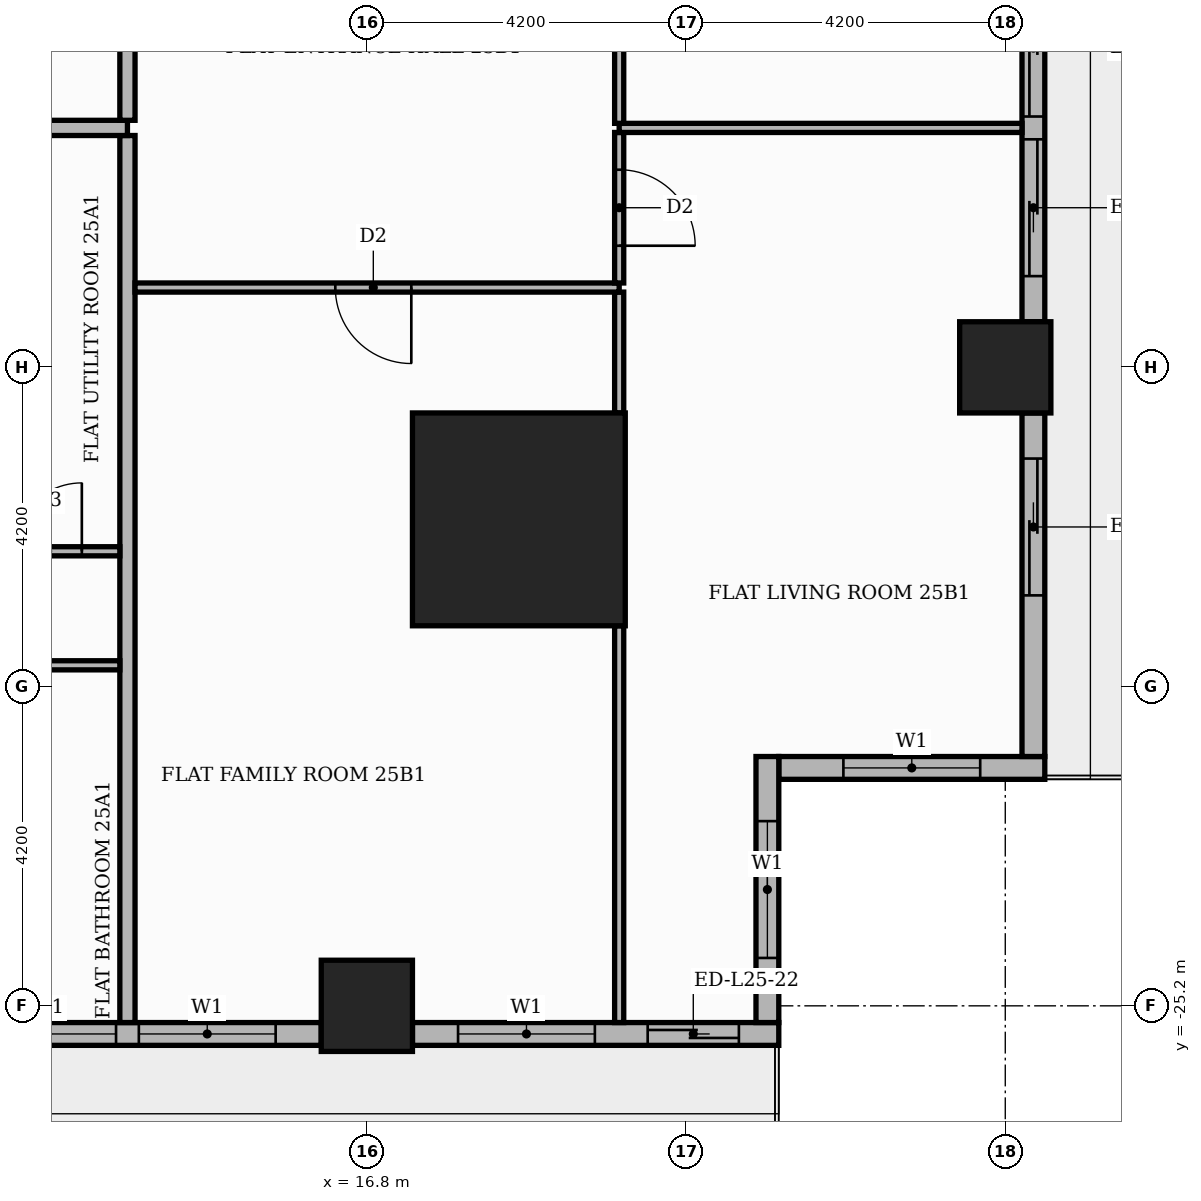
"""IFC4 building model, lengths in metres.
Left out: names, types, materials, properties, quantities, classifications, styles, units other than length and angle.
Written with IfcOpenShell. Run it as: python <this file> out.ifc"""

import sys

from ifc_helpers import new_model, si_unit, direction, frame, frame_2d, origin, origin_2d, place, context, subcontext, project, spatial, rectangle, extrude, element, fill, save


model = new_model("IFC4")
c1 = context("Model", 3, precision=1e-05, world=origin(), true_north=direction((0.0, 1.0)))
c2 = subcontext(c1, "Body", "Model", "MODEL_VIEW")
j1 = project(units=[si_unit("LENGTHUNIT", "METRE"), si_unit("PLANEANGLEUNIT", "RADIAN")], contexts=[c1])
p1 = place(None, origin())
s1 = spatial("IfcSite", under=j1, at=p1, CompositionType="ELEMENT")
p2 = place(p1, origin())
s2 = spatial("IfcBuilding", under=s1, at=p2, CompositionType="ELEMENT")
p3 = place(p2, frame((0.0, 0.0, 106.5)))
s3 = spatial("IfcBuildingStorey", under=s2, at=p3, CompositionType="ELEMENT", Elevation=106.5)
p4 = place(p3, frame((18.8, -18.8, 0.0), z_axis=(0.0, 0.0, 1.0), x_axis=(1.0, 0.0, 0.0)))
e1 = element("IfcColumn", 1, at=p4, inside=s3, PredefinedType="COLUMN", context=c2, shape_type="SweptSolid", body=[
    extrude(rectangle(XDim=2.8, YDim=2.8, at=origin_2d()), origin(), (0.0, 0.0, 1.0), 3.9),
])
for number, where, z_axis, x_axis in (
    (2, (25.2, -16.8, 0.0), (0.0, 0.0, 1.0), (1.0, 0.0, 0.0)),
    (3, (16.8, -25.2, 0.0), (0.0, 0.0, 1.0), (1.0, 0.0, 0.0)),
):
    element("IfcColumn", number, at=place(p3, frame(where, z_axis=z_axis, x_axis=x_axis)), inside=s3, PredefinedType="COLUMN", context=c2, shape_type="SweptSolid", body=[
        extrude(rectangle(XDim=1.2, YDim=1.2, at=origin_2d()), origin(), (0.0, 0.0, 1.0), 3.9),
    ])
p5 = place(p3, frame((22.22, -22.07, 0.0), z_axis=(0.0, 0.0, 1.0), x_axis=(1.0, 0.0, 0.0)))
e4 = element("IfcWall", 4, at=p5, inside=s3, PredefinedType="STANDARD", context=c2, shape_type="SweptSolid", body=[
    extrude(rectangle(XDim=3.5, YDim=0.3, at=frame_2d((1.75, 0.0))), origin(), (0.0, 0.0, 1.0), 3.48),
])
p6 = place(p5, frame((0.85, 0.0, 0.9)))
e5 = element("IfcOpeningElement", 5, at=p6, cuts=e4, PredefinedType="OPENING", context=c2, shape_type="SweptSolid", body=[
    extrude(rectangle(XDim=1.8, YDim=2.1, at=frame_2d((0.9, 1.05))), frame((0.0, 0.16, 0.0), z_axis=(0.0, -1.0, 0.0), x_axis=(1.0, 0.0, 0.0)), (0.0, 0.0, 1.0), 0.32),
])
p7 = place(p3, frame((25.57, -21.92, 0.0), z_axis=(0.0, 0.0, 1.0), x_axis=(0.0, 1.0, 0.0)))
e6 = element("IfcWall", 6, at=p7, inside=s3, PredefinedType="STANDARD", context=c2, shape_type="SweptSolid", body=[
    extrude(rectangle(XDim=4.52, YDim=0.3, at=frame_2d((2.26, 0.0))), origin(), (0.0, 0.0, 1.0), 3.48),
])
p8 = place(p7, frame((2.12, 0.0, 0.0)))
e7 = element("IfcOpeningElement", 7, at=p8, cuts=e6, PredefinedType="OPENING", context=c2, shape_type="SweptSolid", body=[
    extrude(rectangle(XDim=1.8, YDim=2.4, at=frame_2d((0.9, 1.2))), frame((0.0, 0.16, 0.0), z_axis=(0.0, -1.0, 0.0), x_axis=(1.0, 0.0, 0.0)), (0.0, 0.0, 1.0), 0.32),
])
p9 = place(p3, frame((25.57, -16.2, 0.0), z_axis=(0.0, 0.0, 1.0), x_axis=(0.0, 1.0, 0.0)))
e8 = element("IfcWall", 8, at=p9, inside=s3, PredefinedType="STANDARD", context=c2, shape_type="SweptSolid", body=[
    extrude(rectangle(XDim=7.2, YDim=0.3, at=frame_2d((3.6, 0.0))), origin(), (0.0, 0.0, 1.0), 3.48),
])
p10 = place(p9, frame((0.6, 0.0, 0.0)))
e9 = element("IfcOpeningElement", 9, at=p10, cuts=e8, PredefinedType="OPENING", context=c2, shape_type="SweptSolid", body=[
    extrude(rectangle(XDim=1.8, YDim=2.4, at=frame_2d((0.9, 1.2))), frame((0.0, 0.16, 0.0), z_axis=(0.0, -1.0, 0.0), x_axis=(1.0, 0.0, 0.0)), (0.0, 0.0, 1.0), 0.32),
])
p11 = place(p9, frame((2.7, 0.0, 0.0)))
e10 = element("IfcOpeningElement", 10, at=p11, cuts=e8, PredefinedType="OPENING", context=c2, shape_type="SweptSolid", body=[
    extrude(rectangle(XDim=1.8, YDim=2.4, at=frame_2d((0.9, 1.2))), frame((0.0, 0.16, 0.0), z_axis=(0.0, -1.0, 0.0), x_axis=(1.0, 0.0, 0.0)), (0.0, 0.0, 1.0), 0.32),
])
p12 = place(p9, frame((4.8, 0.0, 0.9)))
e11 = element("IfcOpeningElement", 11, at=p12, cuts=e8, PredefinedType="OPENING", context=c2, shape_type="SweptSolid", body=[
    extrude(rectangle(XDim=1.8, YDim=2.1, at=frame_2d((0.9, 1.05))), frame((0.0, 0.16, 0.0), z_axis=(0.0, -1.0, 0.0), x_axis=(1.0, 0.0, 0.0)), (0.0, 0.0, 1.0), 0.32),
])
p13 = place(p3, frame((9.0, -25.57, 0.0), z_axis=(0.0, 0.0, 1.0), x_axis=(1.0, 0.0, 0.0)))
e12 = element("IfcWall", 12, at=p13, inside=s3, PredefinedType="STANDARD", context=c2, shape_type="SweptSolid", body=[
    extrude(rectangle(XDim=7.2, YDim=0.3, at=frame_2d((3.6, 0.0))), origin(), (0.0, 0.0, 1.0), 3.48),
])
p14 = place(p13, frame((0.6, 0.0, 0.9)))
e13 = element("IfcOpeningElement", 13, at=p14, cuts=e12, PredefinedType="OPENING", context=c2, shape_type="SweptSolid", body=[
    extrude(rectangle(XDim=1.8, YDim=2.1, at=frame_2d((0.9, 1.05))), frame((0.0, 0.16, 0.0), z_axis=(0.0, -1.0, 0.0), x_axis=(1.0, 0.0, 0.0)), (0.0, 0.0, 1.0), 0.32),
])
p15 = place(p13, frame((2.7, 0.0, 0.9)))
e14 = element("IfcOpeningElement", 14, at=p15, cuts=e12, PredefinedType="OPENING", context=c2, shape_type="SweptSolid", body=[
    extrude(rectangle(XDim=1.8, YDim=2.1, at=frame_2d((0.9, 1.05))), frame((0.0, 0.16, 0.0), z_axis=(0.0, -1.0, 0.0), x_axis=(1.0, 0.0, 0.0)), (0.0, 0.0, 1.0), 0.32),
])
p16 = place(p13, frame((4.8, 0.0, 0.9)))
e15 = element("IfcOpeningElement", 15, at=p16, cuts=e12, PredefinedType="OPENING", context=c2, shape_type="SweptSolid", body=[
    extrude(rectangle(XDim=1.8, YDim=2.1, at=frame_2d((0.9, 1.05))), frame((0.0, 0.16, 0.0), z_axis=(0.0, -1.0, 0.0), x_axis=(1.0, 0.0, 0.0)), (0.0, 0.0, 1.0), 0.32),
])
p17 = place(p3, frame((17.4, -25.57, 0.0), z_axis=(0.0, 0.0, 1.0), x_axis=(1.0, 0.0, 0.0)))
e16 = element("IfcWall", 16, at=p17, inside=s3, PredefinedType="STANDARD", context=c2, shape_type="SweptSolid", body=[
    extrude(rectangle(XDim=4.82, YDim=0.3, at=frame_2d((2.41, 0.0))), origin(), (0.0, 0.0, 1.0), 3.48),
])
p18 = place(p17, frame((0.6, 0.0, 0.9)))
e17 = element("IfcOpeningElement", 17, at=p18, cuts=e16, PredefinedType="OPENING", context=c2, shape_type="SweptSolid", body=[
    extrude(rectangle(XDim=1.8, YDim=2.1, at=frame_2d((0.9, 1.05))), frame((0.0, 0.16, 0.0), z_axis=(0.0, -1.0, 0.0), x_axis=(1.0, 0.0, 0.0)), (0.0, 0.0, 1.0), 0.32),
])
p19 = place(p17, frame((3.095, 0.0, 0.0)))
e18 = element("IfcOpeningElement", 18, at=p19, cuts=e16, PredefinedType="OPENING", context=c2, shape_type="SweptSolid", body=[
    extrude(rectangle(XDim=1.2, YDim=2.4, at=frame_2d((0.6, 1.2))), frame((0.0, 0.16, 0.0), z_axis=(0.0, -1.0, 0.0), x_axis=(1.0, 0.0, 0.0)), (0.0, 0.0, 1.0), 0.32),
])
p20 = place(p3, frame((22.07, -25.42, 0.0), z_axis=(0.0, 0.0, 1.0), x_axis=(0.0, 1.0, 0.0)))
e19 = element("IfcWall", 19, at=p20, inside=s3, PredefinedType="STANDARD", context=c2, shape_type="SweptSolid", body=[
    extrude(rectangle(XDim=3.5, YDim=0.3, at=frame_2d((1.75, 0.0))), origin(), (0.0, 0.0, 1.0), 3.48),
])
p21 = place(p20, frame((0.85, 0.0, 0.9)))
e20 = element("IfcOpeningElement", 20, at=p21, cuts=e19, PredefinedType="OPENING", context=c2, shape_type="SweptSolid", body=[
    extrude(rectangle(XDim=1.8, YDim=2.1, at=frame_2d((0.9, 1.05))), frame((0.0, 0.16, 0.0), z_axis=(0.0, -1.0, 0.0), x_axis=(1.0, 0.0, 0.0)), (0.0, 0.0, 1.0), 0.32),
])
p22 = place(p3, frame((13.65, -25.42, 0.0), z_axis=(0.0, 0.0, 1.0), x_axis=(0.0, 1.0, 0.0)))
e21 = element("IfcWall", 21, at=p22, inside=s3, PredefinedType="PARTITIONING", context=c2, shape_type="SweptSolid", body=[
    extrude(rectangle(XDim=11.67, YDim=0.2, at=frame_2d((5.835, 0.0))), origin(), (0.0, 0.0, 1.0), 3.48),
])
p23 = place(p3, frame((20.12, -25.42, 0.0), z_axis=(0.0, 0.0, 1.0), x_axis=(0.0, 1.0, 0.0)))
e22 = element("IfcWall", 22, at=p23, inside=s3, PredefinedType="PARTITIONING", context=c2, shape_type="SweptSolid", body=[
    extrude(rectangle(XDim=5.22, YDim=0.12, at=frame_2d((2.61, 0.0))), origin(), (0.0, 0.0, 1.0), 3.48),
])
p24 = place(p3, frame((-25.42, -20.72, 0.0), z_axis=(0.0, 0.0, 1.0), x_axis=(1.0, 0.0, 0.0)))
e23 = element("IfcWall", 23, at=p24, inside=s3, PredefinedType="PARTITIONING", context=c2, shape_type="SweptSolid", body=[
    extrude(rectangle(XDim=38.97, YDim=0.12, at=frame_2d((19.485, 0.0))), origin(), (0.0, 0.0, 1.0), 3.48),
])
p25 = place(p24, frame((10.22, 0.0, 0.0)))
e24 = element("IfcOpeningElement", 24, at=p25, cuts=e23, PredefinedType="OPENING", context=c2, shape_type="SweptSolid", body=[
    extrude(rectangle(XDim=1.0, YDim=2.1, at=frame_2d((0.5, 1.05))), frame((0.0, 0.07, 0.0), z_axis=(0.0, -1.0, 0.0), x_axis=(1.0, 0.0, 0.0)), (0.0, 0.0, 1.0), 0.14),
])
p26 = place(p24, frame((15.47, 0.0, 0.0)))
e25 = element("IfcOpeningElement", 25, at=p26, cuts=e23, PredefinedType="OPENING", context=c2, shape_type="SweptSolid", body=[
    extrude(rectangle(XDim=1.0, YDim=2.1, at=frame_2d((0.5, 1.05))), frame((0.0, 0.07, 0.0), z_axis=(0.0, -1.0, 0.0), x_axis=(1.0, 0.0, 0.0)), (0.0, 0.0, 1.0), 0.14),
])
p27 = place(p24, frame((23.92, 0.0, 0.0)))
e26 = element("IfcOpeningElement", 26, at=p27, cuts=e23, PredefinedType="OPENING", context=c2, shape_type="SweptSolid", body=[
    extrude(rectangle(XDim=0.9, YDim=2.1, at=frame_2d((0.45, 1.05))), frame((0.0, 0.07, 0.0), z_axis=(0.0, -1.0, 0.0), x_axis=(1.0, 0.0, 0.0)), (0.0, 0.0, 1.0), 0.14),
])
p28 = place(p24, frame((34.42, 0.0, 0.0)))
e27 = element("IfcOpeningElement", 27, at=p28, cuts=e23, PredefinedType="OPENING", context=c2, shape_type="SweptSolid", body=[
    extrude(rectangle(XDim=0.9, YDim=2.1, at=frame_2d((0.45, 1.05))), frame((0.0, 0.07, 0.0), z_axis=(0.0, -1.0, 0.0), x_axis=(1.0, 0.0, 0.0)), (0.0, 0.0, 1.0), 0.14),
])
p29 = place(p3, frame((-9.45, -19.22, 0.0), z_axis=(0.0, 0.0, 1.0), x_axis=(1.0, 0.0, 0.0)))
e28 = element("IfcWall", 28, at=p29, inside=s3, PredefinedType="PARTITIONING", context=c2, shape_type="SweptSolid", body=[
    extrude(rectangle(XDim=23.0, YDim=0.12, at=frame_2d((11.5, 0.0))), origin(), (0.0, 0.0, 1.0), 3.48),
])
p30 = place(p29, frame((2.7, 0.0, 0.0)))
e29 = element("IfcOpeningElement", 29, at=p30, cuts=e28, PredefinedType="OPENING", context=c2, shape_type="SweptSolid", body=[
    extrude(rectangle(XDim=0.9, YDim=2.1, at=frame_2d((0.45, 1.05))), frame((0.0, 0.07, 0.0), z_axis=(0.0, -1.0, 0.0), x_axis=(1.0, 0.0, 0.0)), (0.0, 0.0, 1.0), 0.14),
])
p31 = place(p29, frame((7.95, 0.0, 0.0)))
e30 = element("IfcOpeningElement", 30, at=p31, cuts=e28, PredefinedType="OPENING", context=c2, shape_type="SweptSolid", body=[
    extrude(rectangle(XDim=0.9, YDim=2.1, at=frame_2d((0.45, 1.05))), frame((0.0, 0.07, 0.0), z_axis=(0.0, -1.0, 0.0), x_axis=(1.0, 0.0, 0.0)), (0.0, 0.0, 1.0), 0.14),
])
p32 = place(p29, frame((11.1, 0.0, 0.0)))
e31 = element("IfcOpeningElement", 31, at=p32, cuts=e28, PredefinedType="OPENING", context=c2, shape_type="SweptSolid", body=[
    extrude(rectangle(XDim=0.9, YDim=2.1, at=frame_2d((0.45, 1.05))), frame((0.0, 0.07, 0.0), z_axis=(0.0, -1.0, 0.0), x_axis=(1.0, 0.0, 0.0)), (0.0, 0.0, 1.0), 0.14),
])
p33 = place(p29, frame((15.15, 0.0, 0.0)))
e32 = element("IfcOpeningElement", 32, at=p33, cuts=e28, PredefinedType="OPENING", context=c2, shape_type="SweptSolid", body=[
    extrude(rectangle(XDim=0.9, YDim=2.1, at=frame_2d((0.45, 1.05))), frame((0.0, 0.07, 0.0), z_axis=(0.0, -1.0, 0.0), x_axis=(1.0, 0.0, 0.0)), (0.0, 0.0, 1.0), 0.14),
])
p34 = place(p29, frame((19.35, 0.0, 0.0)))
e33 = element("IfcOpeningElement", 33, at=p34, cuts=e28, PredefinedType="OPENING", context=c2, shape_type="SweptSolid", body=[
    extrude(rectangle(XDim=0.9, YDim=2.1, at=frame_2d((0.45, 1.05))), frame((0.0, 0.07, 0.0), z_axis=(0.0, -1.0, 0.0), x_axis=(1.0, 0.0, 0.0)), (0.0, 0.0, 1.0), 0.14),
])
p35 = place(p29, frame((21.6, 0.0, 0.0)))
e34 = element("IfcOpeningElement", 34, at=p35, cuts=e28, PredefinedType="OPENING", context=c2, shape_type="SweptSolid", body=[
    extrude(rectangle(XDim=0.9, YDim=2.1, at=frame_2d((0.45, 1.05))), frame((0.0, 0.07, 0.0), z_axis=(0.0, -1.0, 0.0), x_axis=(1.0, 0.0, 0.0)), (0.0, 0.0, 1.0), 0.14),
])
p36 = place(p3, frame((20.12, -17.4, 0.0), z_axis=(0.0, 0.0, 1.0), x_axis=(0.0, 1.0, 0.0)))
e35 = element("IfcWall", 35, at=p36, inside=s3, PredefinedType="PARTITIONING", context=c2, shape_type="SweptSolid", body=[
    extrude(rectangle(XDim=1.59, YDim=0.12, at=frame_2d((0.795, 0.0))), origin(), (0.0, 0.0, 1.0), 3.48),
])
p37 = place(p3, frame((13.75, -15.75, 0.0), z_axis=(0.0, 0.0, 1.0), x_axis=(1.0, 0.0, 0.0)))
e36 = element("IfcWall", 36, at=p37, inside=s3, PredefinedType="PARTITIONING", context=c2, shape_type="SweptSolid", body=[
    extrude(rectangle(XDim=6.37, YDim=0.12, at=frame_2d((3.185, 0.0))), origin(), (0.0, 0.0, 1.0), 3.48),
])
p38 = place(p37, frame((2.635, 0.0, 0.0)))
e37 = element("IfcOpeningElement", 37, at=p38, cuts=e36, PredefinedType="OPENING", context=c2, shape_type="SweptSolid", body=[
    extrude(rectangle(XDim=1.0, YDim=2.1, at=frame_2d((0.5, 1.05))), frame((0.0, 0.07, 0.0), z_axis=(0.0, -1.0, 0.0), x_axis=(1.0, 0.0, 0.0)), (0.0, 0.0, 1.0), 0.14),
])
p39 = place(p3, frame((20.12, -15.69, 0.0), z_axis=(0.0, 0.0, 1.0), x_axis=(0.0, 1.0, 0.0)))
e38 = element("IfcWall", 38, at=p39, inside=s3, PredefinedType="PARTITIONING", context=c2, shape_type="SweptSolid", body=[
    extrude(rectangle(XDim=1.98, YDim=0.12, at=frame_2d((0.99, 0.0))), origin(), (0.0, 0.0, 1.0), 3.48),
])
p40 = place(p39, frame((0.49, 0.0, 0.0)))
e39 = element("IfcOpeningElement", 39, at=p40, cuts=e38, PredefinedType="OPENING", context=c2, shape_type="SweptSolid", body=[
    extrude(rectangle(XDim=1.0, YDim=2.1, at=frame_2d((0.5, 1.05))), frame((0.0, 0.07, 0.0), z_axis=(0.0, -1.0, 0.0), x_axis=(1.0, 0.0, 0.0)), (0.0, 0.0, 1.0), 0.14),
])
p41 = place(p3, frame((-25.42, -13.65, 0.0), z_axis=(0.0, 0.0, 1.0), x_axis=(1.0, 0.0, 0.0)))
e40 = element("IfcWall", 40, at=p41, inside=s3, PredefinedType="PARTITIONING", context=c2, shape_type="SweptSolid", body=[
    extrude(rectangle(XDim=39.07, YDim=0.2, at=frame_2d((19.535, 0.0))), origin(), (0.0, 0.0, 1.0), 3.48),
])
p42 = place(p41, frame((13.32, 0.0, 0.0)))
e41 = element("IfcOpeningElement", 41, at=p42, cuts=e40, PredefinedType="OPENING", context=c2, shape_type="SweptSolid", body=[
    extrude(rectangle(XDim=1.1, YDim=2.4, at=frame_2d((0.55, 1.2))), frame((0.0, 0.11, 0.0), z_axis=(0.0, -1.0, 0.0), x_axis=(1.0, 0.0, 0.0)), (0.0, 0.0, 1.0), 0.22),
])
p43 = place(p3, frame((20.12, -13.65, 0.0), z_axis=(0.0, 0.0, 1.0), x_axis=(1.0, 0.0, 0.0)))
e42 = element("IfcWall", 42, at=p43, inside=s3, PredefinedType="PARTITIONING", context=c2, shape_type="SweptSolid", body=[
    extrude(rectangle(XDim=5.3, YDim=0.12, at=frame_2d((2.65, 0.0))), origin(), (0.0, 0.0, 1.0), 3.48),
])
p44 = place(p3, frame((20.12, -13.59, 0.0), z_axis=(0.0, 0.0, 1.0), x_axis=(0.0, 1.0, 0.0)))
e43 = element("IfcWall", 43, at=p44, inside=s3, PredefinedType="PARTITIONING", context=c2, shape_type="SweptSolid", body=[
    extrude(rectangle(XDim=4.08, YDim=0.12, at=frame_2d((2.04, 0.0))), origin(), (0.0, 0.0, 1.0), 3.48),
])
p45 = place(p44, frame((1.59, 0.0, 0.0)))
e44 = element("IfcOpeningElement", 44, at=p45, cuts=e43, PredefinedType="OPENING", context=c2, shape_type="SweptSolid", body=[
    extrude(rectangle(XDim=0.9, YDim=2.1, at=frame_2d((0.45, 1.05))), frame((0.0, 0.07, 0.0), z_axis=(0.0, -1.0, 0.0), x_axis=(1.0, 0.0, 0.0)), (0.0, 0.0, 1.0), 0.14),
])
p46 = place(p3, frame((13.65, -13.55, 0.0), z_axis=(0.0, 0.0, 1.0), x_axis=(0.0, 1.0, 0.0)))
e45 = element("IfcWall", 45, at=p46, inside=s3, PredefinedType="PARTITIONING", context=c2, shape_type="SweptSolid", body=[
    extrude(rectangle(XDim=8.2, YDim=0.2, at=frame_2d((4.1, 0.0))), origin(), (0.0, 0.0, 1.0), 3.48),
])
p47 = place(p46, frame((1.45, 0.0, 0.0)))
e46 = element("IfcOpeningElement", 46, at=p47, cuts=e45, PredefinedType="OPENING", context=c2, shape_type="SweptSolid", body=[
    extrude(rectangle(XDim=1.1, YDim=2.4, at=frame_2d((0.55, 1.2))), frame((0.0, 0.11, 0.0), z_axis=(0.0, -1.0, 0.0), x_axis=(1.0, 0.0, 0.0)), (0.0, 0.0, 1.0), 0.22),
])
p48 = place(p6, origin())
e47 = element("IfcWindow", 47, at=p48, inside=s3, PartitioningType="SINGLE_PANEL", PredefinedType="WINDOW", context=c2, shape_type="SweptSolid", body=[
    extrude(rectangle(XDim=1.8, YDim=2.1, at=frame_2d((0.9, 1.05))), frame((0.0, 0.03, 0.0), z_axis=(0.0, -1.0, 0.0), x_axis=(1.0, 0.0, 0.0)), (0.0, 0.0, 1.0), 0.06),
])
fill(e5, e47)
p49 = place(p8, origin())
e48 = element("IfcDoor", 48, at=p49, inside=s3, OperationType="SLIDING_TO_RIGHT", PredefinedType="DOOR", context=c2, shape_type="SweptSolid", body=[
    extrude(rectangle(XDim=1.8, YDim=2.4, at=frame_2d((0.9, 1.2))), frame((0.0, 0.025, 0.0), z_axis=(0.0, -1.0, 0.0), x_axis=(1.0, 0.0, 0.0)), (0.0, 0.0, 1.0), 0.05),
])
fill(e7, e48)
p50 = place(p10, origin())
e49 = element("IfcDoor", 49, at=p50, inside=s3, OperationType="SLIDING_TO_LEFT", PredefinedType="DOOR", context=c2, shape_type="SweptSolid", body=[
    extrude(rectangle(XDim=1.8, YDim=2.4, at=frame_2d((0.9, 1.2))), frame((0.0, 0.025, 0.0), z_axis=(0.0, -1.0, 0.0), x_axis=(1.0, 0.0, 0.0)), (0.0, 0.0, 1.0), 0.05),
])
fill(e9, e49)
p51 = place(p11, origin())
e50 = element("IfcDoor", 50, at=p51, inside=s3, OperationType="SLIDING_TO_RIGHT", PredefinedType="DOOR", context=c2, shape_type="SweptSolid", body=[
    extrude(rectangle(XDim=1.8, YDim=2.4, at=frame_2d((0.9, 1.2))), frame((0.0, 0.025, 0.0), z_axis=(0.0, -1.0, 0.0), x_axis=(1.0, 0.0, 0.0)), (0.0, 0.0, 1.0), 0.05),
])
fill(e10, e50)
p52 = place(p15, origin())
e51 = element("IfcWindow", 51, at=p52, inside=s3, PartitioningType="SINGLE_PANEL", PredefinedType="WINDOW", context=c2, shape_type="SweptSolid", body=[
    extrude(rectangle(XDim=1.8, YDim=2.1, at=frame_2d((0.9, 1.05))), frame((0.0, 0.03, 0.0), z_axis=(0.0, -1.0, 0.0), x_axis=(1.0, 0.0, 0.0)), (0.0, 0.0, 1.0), 0.06),
])
fill(e14, e51)
p53 = place(p16, origin())
e52 = element("IfcWindow", 52, at=p53, inside=s3, PartitioningType="SINGLE_PANEL", PredefinedType="WINDOW", context=c2, shape_type="SweptSolid", body=[
    extrude(rectangle(XDim=1.8, YDim=2.1, at=frame_2d((0.9, 1.05))), frame((0.0, 0.03, 0.0), z_axis=(0.0, -1.0, 0.0), x_axis=(1.0, 0.0, 0.0)), (0.0, 0.0, 1.0), 0.06),
])
fill(e15, e52)
p54 = place(p18, origin())
e53 = element("IfcWindow", 53, at=p54, inside=s3, PartitioningType="SINGLE_PANEL", PredefinedType="WINDOW", context=c2, shape_type="SweptSolid", body=[
    extrude(rectangle(XDim=1.8, YDim=2.1, at=frame_2d((0.9, 1.05))), frame((0.0, 0.03, 0.0), z_axis=(0.0, -1.0, 0.0), x_axis=(1.0, 0.0, 0.0)), (0.0, 0.0, 1.0), 0.06),
])
fill(e17, e53)
p55 = place(p19, origin())
e54 = element("IfcDoor", 54, at=p55, inside=s3, OperationType="SLIDING_TO_RIGHT", PredefinedType="DOOR", context=c2, shape_type="SweptSolid", body=[
    extrude(rectangle(XDim=1.2, YDim=2.4, at=frame_2d((0.6, 1.2))), frame((0.0, 0.025, 0.0), z_axis=(0.0, -1.0, 0.0), x_axis=(1.0, 0.0, 0.0)), (0.0, 0.0, 1.0), 0.05),
])
fill(e18, e54)
p56 = place(p21, origin())
e55 = element("IfcWindow", 55, at=p56, inside=s3, PartitioningType="SINGLE_PANEL", PredefinedType="WINDOW", context=c2, shape_type="SweptSolid", body=[
    extrude(rectangle(XDim=1.8, YDim=2.1, at=frame_2d((0.9, 1.05))), frame((0.0, 0.03, 0.0), z_axis=(0.0, -1.0, 0.0), x_axis=(1.0, 0.0, 0.0)), (0.0, 0.0, 1.0), 0.06),
])
fill(e20, e55)
p57 = place(p35, origin())
e56 = element("IfcDoor", 56, at=p57, inside=s3, OperationType="SINGLE_SWING_RIGHT", PredefinedType="DOOR", context=c2, shape_type="SweptSolid", body=[
    extrude(rectangle(XDim=0.9, YDim=2.1, at=frame_2d((0.45, 1.05))), frame((0.0, 0.025, 0.0), z_axis=(0.0, -1.0, 0.0), x_axis=(1.0, 0.0, 0.0)), (0.0, 0.0, 1.0), 0.05),
])
fill(e34, e56)
p58 = place(p38, frame((1.0, 0.0, 0.0), z_axis=(0.0, 0.0, 1.0), x_axis=(-1.0, 0.0, 0.0)))
e57 = element("IfcDoor", 57, at=p58, inside=s3, OperationType="SINGLE_SWING_RIGHT", PredefinedType="DOOR", context=c2, shape_type="SweptSolid", body=[
    extrude(rectangle(XDim=1.0, YDim=2.1, at=frame_2d((0.5, 1.05))), frame((0.0, 0.025, 0.0), z_axis=(0.0, -1.0, 0.0), x_axis=(1.0, 0.0, 0.0)), (0.0, 0.0, 1.0), 0.05),
])
fill(e37, e57)
p59 = place(p40, frame((1.0, 0.0, 0.0), z_axis=(0.0, 0.0, 1.0), x_axis=(-1.0, 0.0, 0.0)))
e58 = element("IfcDoor", 58, at=p59, inside=s3, OperationType="SINGLE_SWING_LEFT", PredefinedType="DOOR", context=c2, shape_type="SweptSolid", body=[
    extrude(rectangle(XDim=1.0, YDim=2.1, at=frame_2d((0.5, 1.05))), frame((0.0, 0.025, 0.0), z_axis=(0.0, -1.0, 0.0), x_axis=(1.0, 0.0, 0.0)), (0.0, 0.0, 1.0), 0.05),
])
fill(e39, e58)
save(model, sys.argv[1])
